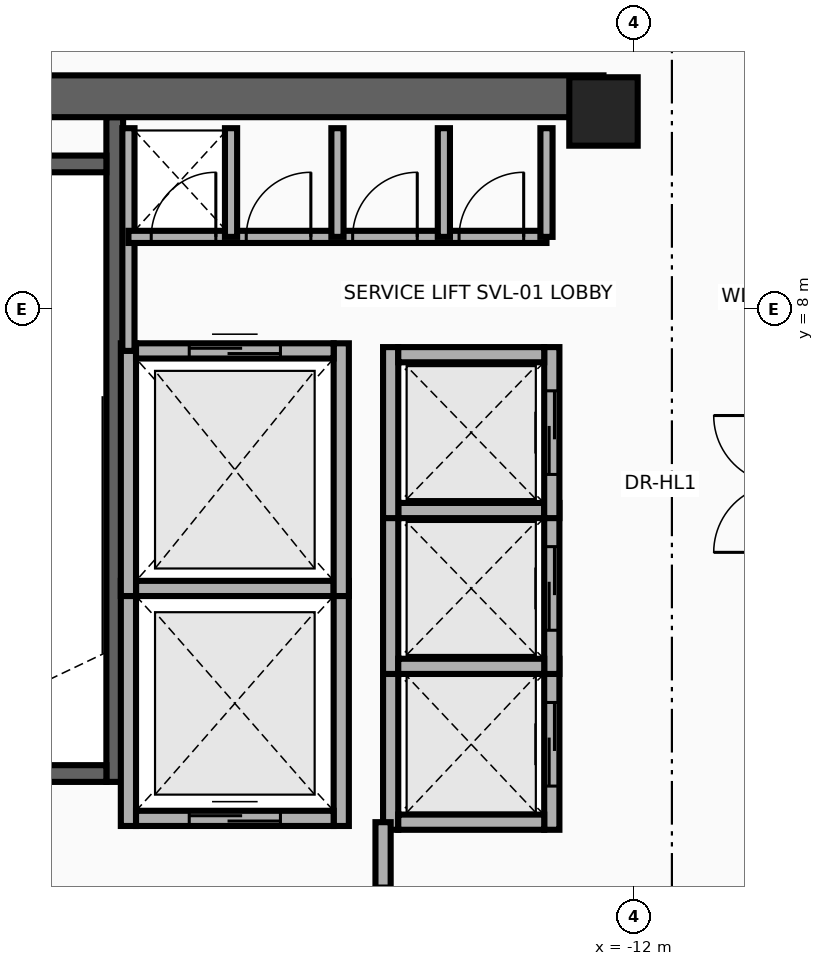
"""IFC4 building model, lengths in metres.
Left out: names, types, materials, properties, quantities, classifications, styles, units other than length and angle.
Written with IfcOpenShell. Run it as: python <this file> out.ifc"""

import sys

from ifc_helpers import new_model, si_unit, direction, frame, frame_2d, origin, origin_2d, place, context, subcontext, project, spatial, rectangle, extrude, source, transform, mapped, element, fill, save


model = new_model("IFC4")
c1 = context("Model", 3, precision=1e-05, world=origin(), true_north=direction((0.0, 1.0)))
c2 = subcontext(c1, "Body", "Model", "MODEL_VIEW")
j1 = project(units=[si_unit("LENGTHUNIT", "METRE"), si_unit("PLANEANGLEUNIT", "RADIAN")], contexts=[c1])
p1 = place(None, origin())
s1 = spatial("IfcSite", under=j1, at=p1, CompositionType="ELEMENT")
p2 = place(p1, origin())
s2 = spatial("IfcBuilding", under=s1, at=p2, CompositionType="ELEMENT")
p3 = place(p2, frame((0.0, 0.0, 201.0)))
s3 = spatial("IfcBuildingStorey", under=s2, at=p3, CompositionType="ELEMENT", Elevation=201.0)
p4 = place(p3, frame((-18.83, 1.78, 0.0), z_axis=(0.0, 0.0, 1.0), x_axis=(0.0, 1.0, 0.0)))
e1 = element("IfcWall", 1, at=p4, inside=s3, PredefinedType="SHEAR", context=c2, shape_type="SweptSolid", body=[
    extrude(rectangle(XDim=8.745, YDim=0.22, at=frame_2d((4.373, 0.0))), origin(), (0.0, 0.0, 1.0), 4.26),
])
p5 = place(p3, frame((-22.05, 1.89, 0.0), z_axis=(0.0, 0.0, 1.0), x_axis=(1.0, 0.0, 0.0)))
e2 = element("IfcWall", 2, at=p5, inside=s3, PredefinedType="SHEAR", context=c2, shape_type="SweptSolid", body=[
    extrude(rectangle(XDim=3.11, YDim=0.22, at=frame_2d((1.555, 0.0))), origin(), (0.0, 0.0, 1.0), 4.26),
])
p6 = place(p5, frame((1.0, 0.0, 0.0)))
e3 = element("IfcOpeningElement", 3, at=p6, cuts=e2, PredefinedType="OPENING", context=c2, shape_type="SweptSolid", body=[
    extrude(rectangle(XDim=1.1, YDim=2.15, at=frame_2d((0.55, 1.075))), frame((0.0, 0.125, 0.0), z_axis=(0.0, -1.0, 0.0), x_axis=(1.0, 0.0, 0.0)), (0.0, 0.0, 1.0), 0.25),
])
p7 = place(p3, frame((-22.05, 9.91, 0.0), z_axis=(0.0, 0.0, 1.0), x_axis=(1.0, 0.0, 0.0)))
e4 = element("IfcWall", 4, at=p7, inside=s3, PredefinedType="SHEAR", context=c2, shape_type="SweptSolid", body=[
    extrude(rectangle(XDim=3.11, YDim=0.22, at=frame_2d((1.555, 0.0))), origin(), (0.0, 0.0, 1.0), 4.26),
])
p8 = place(p3, frame((-22.65, 10.8, 0.0), z_axis=(0.0, 0.0, 1.0), x_axis=(1.0, 0.0, 0.0)))
e5 = element("IfcWall", 5, at=p8, inside=s3, PredefinedType="SHEAR", context=c2, shape_type="SweptSolid", body=[
    extrude(rectangle(XDim=10.25, YDim=0.55, at=frame_2d((5.125, 0.0))), origin(), (0.0, 0.0, 1.0), 4.26),
])
m1 = source(origin(), c2, "Body", "SweptSolid", [
    extrude(rectangle(XDim=0.9, YDim=0.9, at=origin_2d()), origin(), (0.0, 0.0, 1.0), 4.5),
])
p9 = place(p3, frame((-12.4, 10.6, 0.0), z_axis=(0.0, 0.0, 1.0), x_axis=(1.0, 0.0, 0.0)))
e6 = element("IfcColumn", 6, at=p9, inside=s3, PredefinedType="COLUMN", context=c2, shape_type="MappedRepresentation", body=[
    mapped(m1, transform((0.0, 0.0, 0.0), x_axis=(1.0, 0.0, 0.0), y_axis=(0.0, 1.0, 0.0), z_axis=(0.0, 0.0, 1.0), scale=1.0)),
])
for number, where, z_axis, x_axis in (
    (7, (-18.65, 1.2, 0.0), (0.0, 0.0, 1.0), (0.0, 1.0, 0.0)),
    (8, (-15.85, 1.2, 0.0), (0.0, 0.0, 1.0), (0.0, 1.0, 0.0)),
):
    element("IfcWall", number, at=place(p3, frame(where, z_axis=z_axis, x_axis=x_axis)), inside=s3, PredefinedType="MOVABLE", context=c2, shape_type="SweptSolid", body=[
        extrude(rectangle(XDim=3.225, YDim=0.2, at=frame_2d((1.613, 0.0))), origin(), (0.0, 0.0, 1.0), 4.26),
    ])
p10 = place(p3, frame((-18.55, 1.3, 0.0), z_axis=(0.0, 0.0, 1.0), x_axis=(1.0, 0.0, 0.0)))
e9 = element("IfcWall", 9, at=p10, inside=s3, PredefinedType="MOVABLE", context=c2, shape_type="SweptSolid", body=[
    extrude(rectangle(XDim=2.6, YDim=0.2, at=frame_2d((1.3, 0.0))), origin(), (0.0, 0.0, 1.0), 4.26),
])
p11 = place(p10, frame((0.7, 0.0, 0.0)))
e10 = element("IfcOpeningElement", 10, at=p11, cuts=e9, PredefinedType="OPENING", context=c2, shape_type="SweptSolid", body=[
    extrude(rectangle(XDim=1.2, YDim=2.1, at=frame_2d((0.6, 1.05))), frame((0.0, 0.115, 0.0), z_axis=(0.0, -1.0, 0.0), x_axis=(1.0, 0.0, 0.0)), (0.0, 0.0, 1.0), 0.23),
])
p12 = place(p3, frame((-18.55, 4.325, 0.0), z_axis=(0.0, 0.0, 1.0), x_axis=(1.0, 0.0, 0.0)))
e11 = element("IfcWall", 11, at=p12, inside=s3, PredefinedType="MOVABLE", context=c2, shape_type="SweptSolid", body=[
    extrude(rectangle(XDim=2.6, YDim=0.2, at=frame_2d((1.3, 0.0))), origin(), (0.0, 0.0, 1.0), 4.26),
])
for number, where, z_axis, x_axis in (
    (12, (-18.65, 4.225, 0.0), (0.0, 0.0, 1.0), (0.0, 1.0, 0.0)),
    (13, (-15.85, 4.225, 0.0), (0.0, 0.0, 1.0), (0.0, 1.0, 0.0)),
):
    element("IfcWall", number, at=place(p3, frame(where, z_axis=z_axis, x_axis=x_axis)), inside=s3, PredefinedType="MOVABLE", context=c2, shape_type="SweptSolid", body=[
        extrude(rectangle(XDim=3.325, YDim=0.2, at=frame_2d((1.663, 0.0))), origin(), (0.0, 0.0, 1.0), 4.26),
    ])
p13 = place(p3, frame((-18.55, 7.45, 0.0), z_axis=(0.0, 0.0, 1.0), x_axis=(1.0, 0.0, 0.0)))
e14 = element("IfcWall", 14, at=p13, inside=s3, PredefinedType="MOVABLE", context=c2, shape_type="SweptSolid", body=[
    extrude(rectangle(XDim=2.6, YDim=0.2, at=frame_2d((1.3, 0.0))), origin(), (0.0, 0.0, 1.0), 4.26),
])
p14 = place(p13, frame((0.7, 0.0, 0.0)))
e15 = element("IfcOpeningElement", 15, at=p14, cuts=e14, PredefinedType="OPENING", context=c2, shape_type="SweptSolid", body=[
    extrude(rectangle(XDim=1.2, YDim=2.1, at=frame_2d((0.6, 1.05))), frame((0.0, 0.115, 0.0), z_axis=(0.0, -1.0, 0.0), x_axis=(1.0, 0.0, 0.0)), (0.0, 0.0, 1.0), 0.23),
])
p15 = place(p3, frame((-15.2, 1.15, 0.0), z_axis=(0.0, 0.0, 1.0), x_axis=(0.0, 1.0, 0.0)))
e16 = element("IfcWall", 16, at=p15, inside=s3, PredefinedType="MOVABLE", context=c2, shape_type="SweptSolid", body=[
    extrude(rectangle(XDim=2.25, YDim=0.2, at=frame_2d((1.125, 0.0))), origin(), (0.0, 0.0, 1.0), 4.26),
])
p16 = place(p3, frame((-13.08, 1.15, 0.0), z_axis=(0.0, 0.0, 1.0), x_axis=(0.0, 1.0, 0.0)))
e17 = element("IfcWall", 17, at=p16, inside=s3, PredefinedType="MOVABLE", context=c2, shape_type="SweptSolid", body=[
    extrude(rectangle(XDim=2.25, YDim=0.2, at=frame_2d((1.125, 0.0))), origin(), (0.0, 0.0, 1.0), 4.26),
])
p17 = place(p16, frame((0.575, 0.0, 0.0)))
e18 = element("IfcOpeningElement", 18, at=p17, cuts=e17, PredefinedType="OPENING", context=c2, shape_type="SweptSolid", body=[
    extrude(rectangle(XDim=1.1, YDim=2.1, at=frame_2d((0.55, 1.05))), frame((0.0, 0.115, 0.0), z_axis=(0.0, -1.0, 0.0), x_axis=(1.0, 0.0, 0.0)), (0.0, 0.0, 1.0), 0.23),
])
p18 = place(p3, frame((-15.1, 1.25, 0.0), z_axis=(0.0, 0.0, 1.0), x_axis=(1.0, 0.0, 0.0)))
e19 = element("IfcWall", 19, at=p18, inside=s3, PredefinedType="MOVABLE", context=c2, shape_type="SweptSolid", body=[
    extrude(rectangle(XDim=1.92, YDim=0.2, at=frame_2d((0.96, 0.0))), origin(), (0.0, 0.0, 1.0), 4.26),
])
p19 = place(p3, frame((-15.2, 3.2, 0.0), z_axis=(0.0, 0.0, 1.0), x_axis=(0.0, 1.0, 0.0)))
e20 = element("IfcWall", 20, at=p19, inside=s3, PredefinedType="MOVABLE", context=c2, shape_type="SweptSolid", body=[
    extrude(rectangle(XDim=2.25, YDim=0.2, at=frame_2d((1.125, 0.0))), origin(), (0.0, 0.0, 1.0), 4.26),
])
p20 = place(p3, frame((-13.08, 3.2, 0.0), z_axis=(0.0, 0.0, 1.0), x_axis=(0.0, 1.0, 0.0)))
e21 = element("IfcWall", 21, at=p20, inside=s3, PredefinedType="MOVABLE", context=c2, shape_type="SweptSolid", body=[
    extrude(rectangle(XDim=2.25, YDim=0.2, at=frame_2d((1.125, 0.0))), origin(), (0.0, 0.0, 1.0), 4.26),
])
p21 = place(p20, frame((0.575, 0.0, 0.0)))
e22 = element("IfcOpeningElement", 22, at=p21, cuts=e21, PredefinedType="OPENING", context=c2, shape_type="SweptSolid", body=[
    extrude(rectangle(XDim=1.1, YDim=2.1, at=frame_2d((0.55, 1.05))), frame((0.0, 0.115, 0.0), z_axis=(0.0, -1.0, 0.0), x_axis=(1.0, 0.0, 0.0)), (0.0, 0.0, 1.0), 0.23),
])
for number, where, z_axis, x_axis in (
    (23, (-15.1, 3.3, 0.0), (0.0, 0.0, 1.0), (1.0, 0.0, 0.0)),
    (24, (-15.1, 5.35, 0.0), (0.0, 0.0, 1.0), (1.0, 0.0, 0.0)),
):
    element("IfcWall", number, at=place(p3, frame(where, z_axis=z_axis, x_axis=x_axis)), inside=s3, PredefinedType="MOVABLE", context=c2, shape_type="SweptSolid", body=[
        extrude(rectangle(XDim=1.92, YDim=0.2, at=frame_2d((0.96, 0.0))), origin(), (0.0, 0.0, 1.0), 4.26),
    ])
p22 = place(p3, frame((-15.2, 5.25, 0.0), z_axis=(0.0, 0.0, 1.0), x_axis=(0.0, 1.0, 0.0)))
e25 = element("IfcWall", 25, at=p22, inside=s3, PredefinedType="MOVABLE", context=c2, shape_type="SweptSolid", body=[
    extrude(rectangle(XDim=2.25, YDim=0.2, at=frame_2d((1.125, 0.0))), origin(), (0.0, 0.0, 1.0), 4.26),
])
p23 = place(p3, frame((-13.08, 5.25, 0.0), z_axis=(0.0, 0.0, 1.0), x_axis=(0.0, 1.0, 0.0)))
e26 = element("IfcWall", 26, at=p23, inside=s3, PredefinedType="MOVABLE", context=c2, shape_type="SweptSolid", body=[
    extrude(rectangle(XDim=2.25, YDim=0.2, at=frame_2d((1.125, 0.0))), origin(), (0.0, 0.0, 1.0), 4.26),
])
p24 = place(p23, frame((0.575, 0.0, 0.0)))
e27 = element("IfcOpeningElement", 27, at=p24, cuts=e26, PredefinedType="OPENING", context=c2, shape_type="SweptSolid", body=[
    extrude(rectangle(XDim=1.1, YDim=2.1, at=frame_2d((0.55, 1.05))), frame((0.0, 0.115, 0.0), z_axis=(0.0, -1.0, 0.0), x_axis=(1.0, 0.0, 0.0)), (0.0, 0.0, 1.0), 0.23),
])
p25 = place(p3, frame((-15.1, 7.4, 0.0), z_axis=(0.0, 0.0, 1.0), x_axis=(1.0, 0.0, 0.0)))
e28 = element("IfcWall", 28, at=p25, inside=s3, PredefinedType="MOVABLE", context=c2, shape_type="SweptSolid", body=[
    extrude(rectangle(XDim=1.92, YDim=0.2, at=frame_2d((0.96, 0.0))), origin(), (0.0, 0.0, 1.0), 4.26),
])
p26 = place(p3, frame((-15.3, -1.42, 0.0), z_axis=(0.0, 0.0, 1.0), x_axis=(0.0, 1.0, 0.0)))
e29 = element("IfcWall", 29, at=p26, inside=s3, PredefinedType="PARTITIONING", context=c2, shape_type="SweptSolid", body=[
    extrude(rectangle(XDim=2.67, YDim=0.2, at=frame_2d((1.335, 0.0))), origin(), (0.0, 0.0, 1.0), 4.26),
])
p27 = place(p26, frame((0.78, 0.0, 0.0)))
e30 = element("IfcOpeningElement", 30, at=p27, cuts=e29, PredefinedType="OPENING", context=c2, shape_type="SweptSolid", body=[
    extrude(rectangle(XDim=1.05, YDim=2.15, at=frame_2d((0.525, 1.075))), frame((0.0, 0.115, 0.0), z_axis=(0.0, -1.0, 0.0), x_axis=(1.0, 0.0, 0.0)), (0.0, 0.0, 1.0), 0.23),
])
p28 = place(p3, frame((-18.65, 7.45, 0.0), z_axis=(0.0, 0.0, 1.0), x_axis=(0.0, 1.0, 0.0)))
e31 = element("IfcWall", 31, at=p28, inside=s3, PredefinedType="PARTITIONING", context=c2, shape_type="SweptSolid", body=[
    extrude(rectangle(XDim=2.93, YDim=0.16, at=frame_2d((1.465, 0.0))), origin(), (0.0, 0.0, 1.0), 4.26),
])
p29 = place(p3, frame((-18.65, 8.95, 0.0), z_axis=(0.0, 0.0, 1.0), x_axis=(1.0, 0.0, 0.0)))
e32 = element("IfcWall", 32, at=p29, inside=s3, PredefinedType="PARTITIONING", context=c2, shape_type="SweptSolid", body=[
    extrude(rectangle(XDim=5.5, YDim=0.16, at=frame_2d((2.75, 0.0))), origin(), (0.0, 0.0, 1.0), 4.26),
])
p30 = place(p29, frame((0.3, 0.0, 0.0)))
e33 = element("IfcOpeningElement", 33, at=p30, cuts=e32, PredefinedType="OPENING", context=c2, shape_type="SweptSolid", body=[
    extrude(rectangle(XDim=0.85, YDim=2.05, at=frame_2d((0.425, 1.025))), frame((0.0, 0.095, 0.0), z_axis=(0.0, -1.0, 0.0), x_axis=(1.0, 0.0, 0.0)), (0.0, 0.0, 1.0), 0.19),
])
p31 = place(p29, frame((1.55, 0.0, 0.0)))
e34 = element("IfcOpeningElement", 34, at=p31, cuts=e32, PredefinedType="OPENING", context=c2, shape_type="SweptSolid", body=[
    extrude(rectangle(XDim=0.85, YDim=2.05, at=frame_2d((0.425, 1.025))), frame((0.0, 0.095, 0.0), z_axis=(0.0, -1.0, 0.0), x_axis=(1.0, 0.0, 0.0)), (0.0, 0.0, 1.0), 0.19),
])
p32 = place(p29, frame((2.95, 0.0, 0.0)))
e35 = element("IfcOpeningElement", 35, at=p32, cuts=e32, PredefinedType="OPENING", context=c2, shape_type="SweptSolid", body=[
    extrude(rectangle(XDim=0.85, YDim=2.05, at=frame_2d((0.425, 1.025))), frame((0.0, 0.095, 0.0), z_axis=(0.0, -1.0, 0.0), x_axis=(1.0, 0.0, 0.0)), (0.0, 0.0, 1.0), 0.19),
])
p33 = place(p29, frame((4.35, 0.0, 0.0)))
e36 = element("IfcOpeningElement", 36, at=p33, cuts=e32, PredefinedType="OPENING", context=c2, shape_type="SweptSolid", body=[
    extrude(rectangle(XDim=0.85, YDim=2.05, at=frame_2d((0.425, 1.025))), frame((0.0, 0.095, 0.0), z_axis=(0.0, -1.0, 0.0), x_axis=(1.0, 0.0, 0.0)), (0.0, 0.0, 1.0), 0.19),
])
for number, where, z_axis, x_axis in (
    (37, (-13.15, 8.95, 0.0), (0.0, 0.0, 1.0), (0.0, 1.0, 0.0)),
    (38, (-17.3, 8.95, 0.0), (0.0, 0.0, 1.0), (0.0, 1.0, 0.0)),
    (39, (-15.9, 8.95, 0.0), (0.0, 0.0, 1.0), (0.0, 1.0, 0.0)),
    (40, (-14.5, 8.95, 0.0), (0.0, 0.0, 1.0), (0.0, 1.0, 0.0)),
):
    element("IfcWall", number, at=place(p3, frame(where, z_axis=z_axis, x_axis=x_axis)), inside=s3, PredefinedType="PARTITIONING", context=c2, shape_type="SweptSolid", body=[
        extrude(rectangle(XDim=1.43, YDim=0.16, at=frame_2d((0.715, 0.0))), origin(), (0.0, 0.0, 1.0), 4.26),
    ])
p34 = place(p11, origin())
e41 = element("IfcDoor", 41, at=p34, inside=s3, OperationType="DOUBLE_DOOR_SLIDING", PredefinedType="DOOR", context=c2, shape_type="SweptSolid", body=[
    extrude(rectangle(XDim=1.2, YDim=2.1, at=frame_2d((0.6, 1.05))), frame((0.0, 0.025, 0.0), z_axis=(0.0, -1.0, 0.0), x_axis=(1.0, 0.0, 0.0)), (0.0, 0.0, 1.0), 0.05),
])
fill(e10, e41)
p35 = place(p14, origin())
e42 = element("IfcDoor", 42, at=p35, inside=s3, OperationType="DOUBLE_DOOR_SLIDING", PredefinedType="DOOR", context=c2, shape_type="SweptSolid", body=[
    extrude(rectangle(XDim=1.2, YDim=2.1, at=frame_2d((0.6, 1.05))), frame((0.0, 0.025, 0.0), z_axis=(0.0, -1.0, 0.0), x_axis=(1.0, 0.0, 0.0)), (0.0, 0.0, 1.0), 0.05),
])
fill(e15, e42)
p36 = place(p17, origin())
e43 = element("IfcDoor", 43, at=p36, inside=s3, OperationType="DOUBLE_DOOR_SLIDING", PredefinedType="DOOR", context=c2, shape_type="SweptSolid", body=[
    extrude(rectangle(XDim=1.1, YDim=2.1, at=frame_2d((0.55, 1.05))), frame((0.0, 0.025, 0.0), z_axis=(0.0, -1.0, 0.0), x_axis=(1.0, 0.0, 0.0)), (0.0, 0.0, 1.0), 0.05),
])
fill(e18, e43)
p37 = place(p21, origin())
e44 = element("IfcDoor", 44, at=p37, inside=s3, OperationType="DOUBLE_DOOR_SLIDING", PredefinedType="DOOR", context=c2, shape_type="SweptSolid", body=[
    extrude(rectangle(XDim=1.1, YDim=2.1, at=frame_2d((0.55, 1.05))), frame((0.0, 0.025, 0.0), z_axis=(0.0, -1.0, 0.0), x_axis=(1.0, 0.0, 0.0)), (0.0, 0.0, 1.0), 0.05),
])
fill(e22, e44)
p38 = place(p24, origin())
e45 = element("IfcDoor", 45, at=p38, inside=s3, OperationType="DOUBLE_DOOR_SLIDING", PredefinedType="DOOR", context=c2, shape_type="SweptSolid", body=[
    extrude(rectangle(XDim=1.1, YDim=2.1, at=frame_2d((0.55, 1.05))), frame((0.0, 0.025, 0.0), z_axis=(0.0, -1.0, 0.0), x_axis=(1.0, 0.0, 0.0)), (0.0, 0.0, 1.0), 0.05),
])
fill(e27, e45)
p39 = place(p27, origin())
e46 = element("IfcDoor", 46, at=p39, inside=s3, OperationType="SINGLE_SWING_RIGHT", PredefinedType="DOOR", context=c2, shape_type="SweptSolid", body=[
    extrude(rectangle(XDim=1.05, YDim=2.15, at=frame_2d((0.525, 1.075))), frame((0.0, 0.025, 0.0), z_axis=(0.0, -1.0, 0.0), x_axis=(1.0, 0.0, 0.0)), (0.0, 0.0, 1.0), 0.05),
])
fill(e30, e46)
p40 = place(p30, origin())
e47 = element("IfcDoor", 47, at=p40, inside=s3, OperationType="SINGLE_SWING_LEFT", PredefinedType="DOOR", context=c2, shape_type="SweptSolid", body=[
    extrude(rectangle(XDim=0.85, YDim=2.05, at=frame_2d((0.425, 1.025))), frame((0.0, 0.025, 0.0), z_axis=(0.0, -1.0, 0.0), x_axis=(1.0, 0.0, 0.0)), (0.0, 0.0, 1.0), 0.05),
])
fill(e33, e47)
p41 = place(p31, origin())
e48 = element("IfcDoor", 48, at=p41, inside=s3, OperationType="SINGLE_SWING_RIGHT", PredefinedType="DOOR", context=c2, shape_type="SweptSolid", body=[
    extrude(rectangle(XDim=0.85, YDim=2.05, at=frame_2d((0.425, 1.025))), frame((0.0, 0.025, 0.0), z_axis=(0.0, -1.0, 0.0), x_axis=(1.0, 0.0, 0.0)), (0.0, 0.0, 1.0), 0.05),
])
fill(e34, e48)
p42 = place(p32, origin())
e49 = element("IfcDoor", 49, at=p42, inside=s3, OperationType="SINGLE_SWING_LEFT", PredefinedType="DOOR", context=c2, shape_type="SweptSolid", body=[
    extrude(rectangle(XDim=0.85, YDim=2.05, at=frame_2d((0.425, 1.025))), frame((0.0, 0.025, 0.0), z_axis=(0.0, -1.0, 0.0), x_axis=(1.0, 0.0, 0.0)), (0.0, 0.0, 1.0), 0.05),
])
fill(e35, e49)
p43 = place(p33, origin())
e50 = element("IfcDoor", 50, at=p43, inside=s3, OperationType="SINGLE_SWING_RIGHT", PredefinedType="DOOR", context=c2, shape_type="SweptSolid", body=[
    extrude(rectangle(XDim=0.85, YDim=2.05, at=frame_2d((0.425, 1.025))), frame((0.0, 0.025, 0.0), z_axis=(0.0, -1.0, 0.0), x_axis=(1.0, 0.0, 0.0)), (0.0, 0.0, 1.0), 0.05),
])
fill(e36, e50)
save(model, sys.argv[1])
